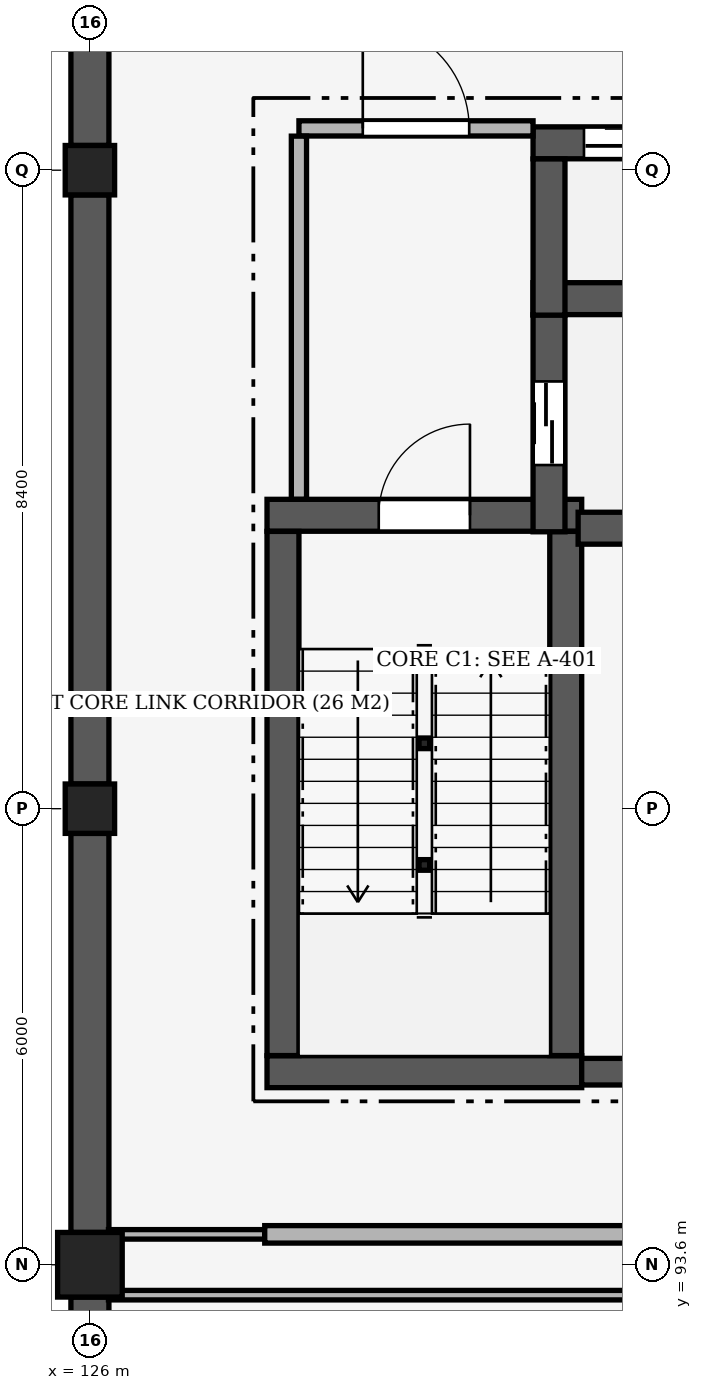
"""IFC4 building model, lengths in metres.
Left out: names, types, materials, properties, quantities, classifications, styles, units other than length and angle.
Written with IfcOpenShell. Run it as: python <this file> out.ifc"""

import sys

from ifc_helpers import new_model, si_unit, direction, frame, frame_2d, origin, origin_2d, place, context, subcontext, project, spatial, rectangle, hollow_circle, extrude, element, fill, save


model = new_model("IFC4")
c1 = context("Model", 3, precision=1e-05, world=origin(), true_north=direction((0.0, 1.0)))
c2 = subcontext(c1, "Body", "Model", "MODEL_VIEW")
j1 = project(units=[si_unit("LENGTHUNIT", "METRE"), si_unit("PLANEANGLEUNIT", "RADIAN")], contexts=[c1])
p1 = place(None, origin())
s1 = spatial("IfcSite", under=j1, at=p1, CompositionType="ELEMENT")
p2 = place(p1, origin())
s2 = spatial("IfcBuilding", under=s1, at=p2, CompositionType="ELEMENT")
p3 = place(p2, frame((0.0, 0.0, -4.8)))
s3 = spatial("IfcBuildingStorey", under=s2, at=p3, CompositionType="ELEMENT", Elevation=-4.8)
p4 = place(p3, frame((126.0, 93.6, 0.0), z_axis=(0.0, 0.0, 1.0), x_axis=(1.0, 0.0, 0.0)))
e1 = element("IfcColumn", 1, at=p4, inside=s3, PredefinedType="COLUMN", context=c2, shape_type="SweptSolid", body=[
    extrude(rectangle(XDim=0.85, YDim=0.85, at=origin_2d()), origin(), (0.0, 0.0, 1.0), 4.8),
])
for number, where, z_axis, x_axis in (
    (2, (126.0, 99.6, 0.0), (0.0, 0.0, 1.0), (1.0, 0.0, 0.0)),
    (3, (126.0, 108.0, 0.0), (0.0, 0.0, 1.0), (1.0, 0.0, 0.0)),
):
    element("IfcColumn", number, at=place(p3, frame(where, z_axis=z_axis, x_axis=x_axis)), inside=s3, PredefinedType="COLUMN", context=c2, shape_type="SweptSolid", body=[
        extrude(rectangle(XDim=0.65, YDim=0.65, at=origin_2d()), origin(), (0.0, 0.0, 1.0), 4.8),
    ])
for number, where, z_axis, x_axis in (
    (4, (130.4, 98.86, 0.0), (0.0, 0.0, 1.0), (1.0, 0.0, 0.0)),
    (5, (130.4, 100.46, 0.0), (0.0, 0.0, 1.0), (1.0, 0.0, 0.0)),
):
    element("IfcColumn", number, at=place(p3, frame(where, z_axis=z_axis, x_axis=x_axis)), inside=s3, PredefinedType="COLUMN", context=c2, shape_type="SweptSolid", body=[
        extrude(hollow_circle(Radius=0.07, WallThickness=0.008, at=origin_2d()), origin(), (0.0, 0.0, 1.0), 1.97),
    ])
p5 = place(p3, frame((126.0, 85.625, 0.0), z_axis=(0.0, 0.0, 1.0), x_axis=(0.0, 1.0, 0.0)))
e6 = element("IfcWall", 6, at=p5, inside=s3, PredefinedType="USERDEFINED", context=c2, shape_type="SweptSolid", body=[
    extrude(rectangle(XDim=7.55, YDim=0.5, at=frame_2d((3.775, 0.0))), origin(), (0.0, 0.0, 1.0), 3.7),
])
p6 = place(p3, frame((126.0, 94.025, 0.0), z_axis=(0.0, 0.0, 1.0), x_axis=(0.0, 1.0, 0.0)))
e7 = element("IfcWall", 7, at=p6, inside=s3, PredefinedType="USERDEFINED", context=c2, shape_type="SweptSolid", body=[
    extrude(rectangle(XDim=5.25, YDim=0.5, at=frame_2d((2.625, 0.0))), origin(), (0.0, 0.0, 1.0), 3.85),
])
p7 = place(p3, frame((126.0, 99.925, 0.0), z_axis=(0.0, 0.0, 1.0), x_axis=(0.0, 1.0, 0.0)))
e8 = element("IfcWall", 8, at=p7, inside=s3, PredefinedType="USERDEFINED", context=c2, shape_type="SweptSolid", body=[
    extrude(rectangle(XDim=7.75, YDim=0.5, at=frame_2d((3.875, 0.0))), origin(), (0.0, 0.0, 1.0), 3.7),
])
p8 = place(p3, frame((126.0, 108.325, 0.0), z_axis=(0.0, 0.0, 1.0), x_axis=(0.0, 1.0, 0.0)))
e9 = element("IfcWall", 9, at=p8, inside=s3, PredefinedType="USERDEFINED", context=c2, shape_type="SweptSolid", body=[
    extrude(rectangle(XDim=4.75, YDim=0.5, at=frame_2d((2.375, 0.0))), origin(), (0.0, 0.0, 1.0), 3.85),
])
p9 = place(p3, frame((128.33, 103.46, 0.0), z_axis=(0.0, 0.0, 1.0), x_axis=(1.0, 0.0, 0.0)))
e10 = element("IfcWall", 10, at=p9, inside=s3, PredefinedType="SHEAR", context=c2, shape_type="SweptSolid", body=[
    extrude(rectangle(XDim=4.14, YDim=0.42, at=frame_2d((2.07, 0.0))), origin(), (0.0, 0.0, 1.0), 4.5),
])
p10 = place(p9, frame((1.47, 0.0, 0.0)))
e11 = element("IfcOpeningElement", 11, at=p10, cuts=e10, PredefinedType="OPENING", context=c2, shape_type="SweptSolid", body=[
    extrude(rectangle(XDim=1.2, YDim=2.2, at=frame_2d((0.6, 1.1))), frame((0.0, 0.225, 0.0), z_axis=(0.0, -1.0, 0.0), x_axis=(1.0, 0.0, 0.0)), (0.0, 0.0, 1.0), 0.45),
])
p11 = place(p3, frame((128.33, 96.14, 0.0), z_axis=(0.0, 0.0, 1.0), x_axis=(1.0, 0.0, 0.0)))
e12 = element("IfcWall", 12, at=p11, inside=s3, PredefinedType="SHEAR", context=c2, shape_type="SweptSolid", body=[
    extrude(rectangle(XDim=4.14, YDim=0.42, at=frame_2d((2.07, 0.0))), origin(), (0.0, 0.0, 1.0), 4.5),
])
for number, where, z_axis, x_axis in (
    (13, (128.54, 96.352, 0.0), (0.0, 0.0, 1.0), (0.0, 1.0, 0.0)),
    (14, (132.26, 96.352, 0.0), (0.0, 0.0, 1.0), (0.0, 1.0, 0.0)),
):
    element("IfcWall", number, at=place(p3, frame(where, z_axis=z_axis, x_axis=x_axis)), inside=s3, PredefinedType="SHEAR", context=c2, shape_type="SweptSolid", body=[
        extrude(rectangle(XDim=6.896, YDim=0.42, at=frame_2d((3.448, 0.0))), origin(), (0.0, 0.0, 1.0), 4.5),
    ])
p12 = place(p3, frame((132.423, 103.29, 0.0), z_axis=(0.0, 0.0, 1.0), x_axis=(1.0, 0.0, 0.0)))
e15 = element("IfcWall", 15, at=p12, inside=s3, PredefinedType="SHEAR", context=c2, shape_type="SweptSolid", body=[
    extrude(rectangle(XDim=1.847, YDim=0.42, at=frame_2d((0.923, 0.0))), origin(), (0.0, 0.0, 1.0), 4.5),
])
p13 = place(p3, frame((131.83, 106.31, 0.0), z_axis=(0.0, 0.0, 1.0), x_axis=(1.0, 0.0, 0.0)))
e16 = element("IfcWall", 16, at=p13, inside=s3, PredefinedType="SHEAR", context=c2, shape_type="SweptSolid", body=[
    extrude(rectangle(XDim=2.44, YDim=0.42, at=frame_2d((1.22, 0.0))), origin(), (0.0, 0.0, 1.0), 4.5),
])
p14 = place(p3, frame((132.04, 103.243, 0.0), z_axis=(0.0, 0.0, 1.0), x_axis=(0.0, 1.0, 0.0)))
e17 = element("IfcWall", 17, at=p14, inside=s3, PredefinedType="SHEAR", context=c2, shape_type="SweptSolid", body=[
    extrude(rectangle(XDim=2.855, YDim=0.42, at=frame_2d((1.427, 0.0))), origin(), (0.0, 0.0, 1.0), 4.5),
])
p15 = place(p14, frame((0.878, 0.0, 0.0)))
e18 = element("IfcOpeningElement", 18, at=p15, cuts=e17, PredefinedType="OPENING", context=c2, shape_type="SweptSolid", body=[
    extrude(rectangle(XDim=1.1, YDim=2.15, at=frame_2d((0.55, 1.075))), frame((0.0, 0.225, 0.0), z_axis=(0.0, -1.0, 0.0), x_axis=(1.0, 0.0, 0.0)), (0.0, 0.0, 1.0), 0.45),
])
p16 = place(p3, frame((131.83, 108.36, 0.0), z_axis=(0.0, 0.0, 1.0), x_axis=(1.0, 0.0, 0.0)))
e19 = element("IfcWall", 19, at=p16, inside=s3, PredefinedType="SHEAR", context=c2, shape_type="SweptSolid", body=[
    extrude(rectangle(XDim=2.44, YDim=0.42, at=frame_2d((1.22, 0.0))), origin(), (0.0, 0.0, 1.0), 4.5),
])
p17 = place(p16, frame((0.67, 0.0, 0.0)))
e20 = element("IfcOpeningElement", 20, at=p17, cuts=e19, PredefinedType="OPENING", context=c2, shape_type="SweptSolid", body=[
    extrude(rectangle(XDim=1.1, YDim=2.15, at=frame_2d((0.55, 1.075))), frame((0.0, 0.225, 0.0), z_axis=(0.0, -1.0, 0.0), x_axis=(1.0, 0.0, 0.0)), (0.0, 0.0, 1.0), 0.45),
])
p18 = place(p3, frame((132.04, 106.093, 0.0), z_axis=(0.0, 0.0, 1.0), x_axis=(0.0, 1.0, 0.0)))
e21 = element("IfcWall", 21, at=p18, inside=s3, PredefinedType="SHEAR", context=c2, shape_type="SweptSolid", body=[
    extrude(rectangle(XDim=2.055, YDim=0.42, at=frame_2d((1.027, 0.0))), origin(), (0.0, 0.0, 1.0), 4.5),
])
p19 = place(p3, frame((132.47, 96.14, 0.0), z_axis=(0.0, 0.0, 1.0), x_axis=(1.0, 0.0, 0.0)))
e22 = element("IfcWall", 22, at=p19, inside=s3, PredefinedType="SHEAR", context=c2, shape_type="SweptSolid", body=[
    extrude(rectangle(XDim=1.8, YDim=0.35, at=frame_2d((0.9, 0.0))), origin(), (0.0, 0.0, 1.0), 4.5),
])
p20 = place(p3, frame((126.244, 93.2, 0.0), z_axis=(0.0, 0.0, 1.0), x_axis=(1.0, 0.0, 0.0)))
e23 = element("IfcWall", 23, at=p20, inside=s3, PredefinedType="PARTITIONING", context=c2, shape_type="SweptSolid", body=[
    extrude(rectangle(XDim=12.556, YDim=0.125, at=frame_2d((6.278, 0.0))), origin(), (0.0, 0.0, 1.0), 3.7),
])
p21 = place(p3, frame((126.244, 94.0, 0.0), z_axis=(0.0, 0.0, 1.0), x_axis=(1.0, 0.0, 0.0)))
e24 = element("IfcWall", 24, at=p21, inside=s3, PredefinedType="PARTITIONING", context=c2, shape_type="SweptSolid", body=[
    extrude(rectangle(XDim=2.056, YDim=0.125, at=frame_2d((1.028, 0.0))), origin(), (0.0, 0.0, 1.0), 4.5),
])
p22 = place(p3, frame((128.3, 94.0, 0.0), z_axis=(0.0, 0.0, 1.0), x_axis=(1.0, 0.0, 0.0)))
e25 = element("IfcWall", 25, at=p22, inside=s3, PredefinedType="SOLIDWALL", context=c2, shape_type="SweptSolid", body=[
    extrude(rectangle(XDim=10.5, YDim=0.23, at=frame_2d((5.25, 0.0))), origin(), (0.0, 0.0, 1.0), 3.85),
])
p23 = place(p3, frame((128.75, 108.55, 0.0), z_axis=(0.0, 0.0, 1.0), x_axis=(1.0, 0.0, 0.0)))
e26 = element("IfcWall", 26, at=p23, inside=s3, PredefinedType="PARTITIONING", context=c2, shape_type="SweptSolid", body=[
    extrude(rectangle(XDim=3.08, YDim=0.2, at=frame_2d((1.54, 0.0))), origin(), (0.0, 0.0, 1.0), 4.5),
])
p24 = place(p23, frame((0.84, 0.0, 0.0)))
e27 = element("IfcOpeningElement", 27, at=p24, cuts=e26, PredefinedType="OPENING", context=c2, shape_type="SweptSolid", body=[
    extrude(rectangle(XDim=1.4, YDim=2.2, at=frame_2d((0.7, 1.1))), frame((0.0, 0.115, 0.0), z_axis=(0.0, -1.0, 0.0), x_axis=(1.0, 0.0, 0.0)), (0.0, 0.0, 1.0), 0.23),
])
p25 = place(p3, frame((128.75, 103.672, 0.0), z_axis=(0.0, 0.0, 1.0), x_axis=(0.0, 1.0, 0.0)))
e28 = element("IfcWall", 28, at=p25, inside=s3, PredefinedType="PARTITIONING", context=c2, shape_type="SweptSolid", body=[
    extrude(rectangle(XDim=4.776, YDim=0.2, at=frame_2d((2.388, 0.0))), origin(), (0.0, 0.0, 1.0), 4.5),
])
p26 = place(p10, origin())
e29 = element("IfcDoor", 29, at=p26, inside=s3, OperationType="SINGLE_SWING_RIGHT", PredefinedType="DOOR", context=c2, shape_type="SweptSolid", body=[
    extrude(rectangle(XDim=1.2, YDim=2.2, at=frame_2d((0.6, 1.1))), frame((0.0, 0.025, 0.0), z_axis=(0.0, -1.0, 0.0), x_axis=(1.0, 0.0, 0.0)), (0.0, 0.0, 1.0), 0.05),
])
fill(e11, e29)
p27 = place(p15, origin())
e30 = element("IfcDoor", 30, at=p27, inside=s3, OperationType="DOUBLE_DOOR_SLIDING", PredefinedType="DOOR", context=c2, shape_type="SweptSolid", body=[
    extrude(rectangle(XDim=1.1, YDim=2.15, at=frame_2d((0.55, 1.075))), frame((0.0, 0.025, 0.0), z_axis=(0.0, -1.0, 0.0), x_axis=(1.0, 0.0, 0.0)), (0.0, 0.0, 1.0), 0.05),
])
fill(e18, e30)
p28 = place(p17, origin())
e31 = element("IfcDoor", 31, at=p28, inside=s3, OperationType="DOUBLE_DOOR_SLIDING", PredefinedType="DOOR", context=c2, shape_type="SweptSolid", body=[
    extrude(rectangle(XDim=1.1, YDim=2.15, at=frame_2d((0.55, 1.075))), frame((0.0, 0.025, 0.0), z_axis=(0.0, -1.0, 0.0), x_axis=(1.0, 0.0, 0.0)), (0.0, 0.0, 1.0), 0.05),
])
fill(e20, e31)
p29 = place(p24, origin())
e32 = element("IfcDoor", 32, at=p29, inside=s3, OperationType="SINGLE_SWING_LEFT", PredefinedType="DOOR", context=c2, shape_type="SweptSolid", body=[
    extrude(rectangle(XDim=1.4, YDim=2.2, at=frame_2d((0.7, 1.1))), frame((0.0, 0.025, 0.0), z_axis=(0.0, -1.0, 0.0), x_axis=(1.0, 0.0, 0.0)), (0.0, 0.0, 1.0), 0.05),
])
fill(e27, e32)
save(model, sys.argv[1])
